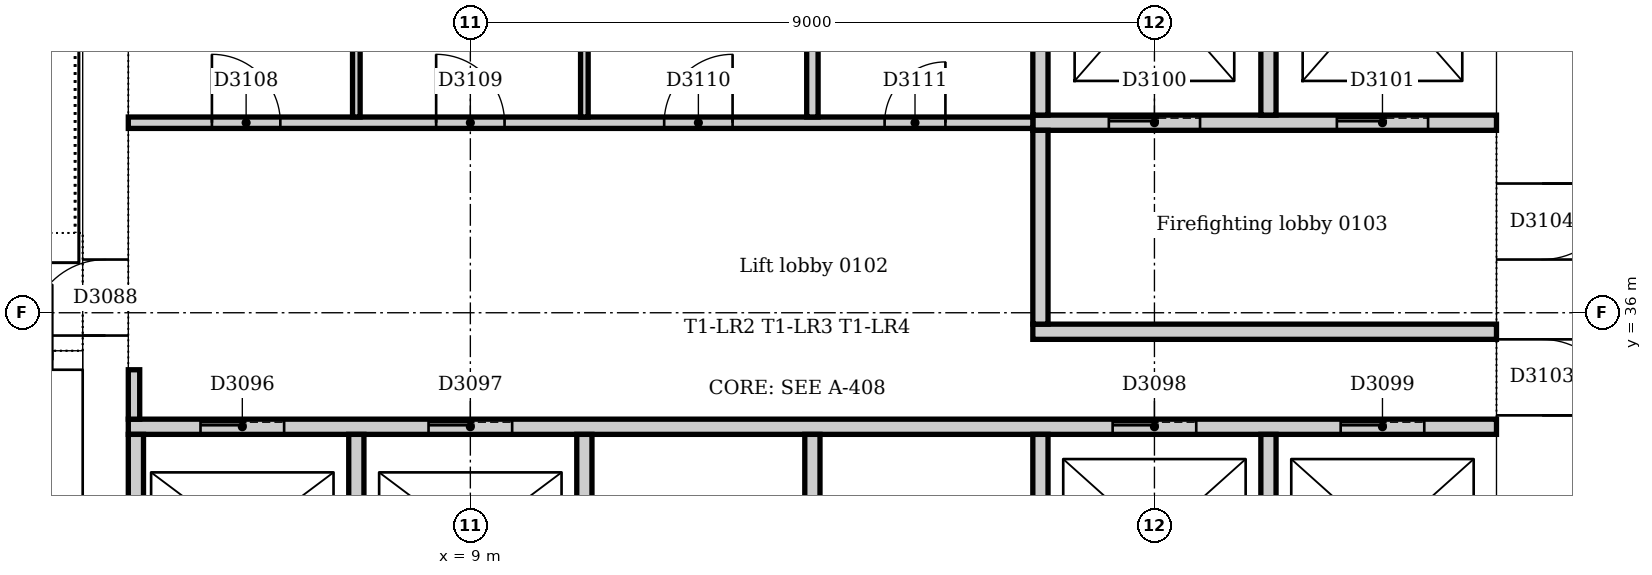
"""IFC4 building model, lengths in metres.
Left out: names, types, materials, properties, quantities, classifications, styles, units other than length and angle.
Written with IfcOpenShell. Run it as: python <this file> out.ifc"""

import sys

from ifc_helpers import new_model, si_unit, direction, frame, frame_2d, origin, place, context, subcontext, project, spatial, rectangle, extrude, element, fill, save


model = new_model("IFC4")
c1 = context("Model", 3, precision=1e-05, world=origin(), true_north=direction((0.0, 1.0)))
c2 = subcontext(c1, "Body", "Model", "MODEL_VIEW")
j1 = project(units=[si_unit("LENGTHUNIT", "METRE"), si_unit("PLANEANGLEUNIT", "RADIAN")], contexts=[c1])
p1 = place(None, origin())
s1 = spatial("IfcSite", under=j1, at=p1, CompositionType="ELEMENT")
p2 = place(p1, origin())
s2 = spatial("IfcBuilding", under=s1, at=p2, CompositionType="ELEMENT")
p3 = place(p2, frame((0.0, 0.0, 6.0)))
s3 = spatial("IfcBuildingStorey", under=s2, at=p3, CompositionType="ELEMENT", Elevation=6.0)
p4 = place(p3, frame((23.1, 31.5, 0.0), z_axis=(0.0, 0.0, 1.0), x_axis=(0.0, 1.0, 0.0)))
e1 = element("IfcWall", 1, at=p4, inside=s3, PredefinedType="SOLIDWALL", context=c2, shape_type="SweptSolid", body=[
    extrude(rectangle(XDim=10.5, YDim=1.2, at=frame_2d((5.25, 0.0))), origin(), (0.0, 0.0, 1.0), 5.0),
])
p5 = place(p4, frame((3.15, 0.0, 0.0)))
e2 = element("IfcOpeningElement", 2, at=p5, cuts=e1, PredefinedType="OPENING", context=c2, shape_type="SweptSolid", body=[
    extrude(rectangle(XDim=1.0, YDim=2.1, at=frame_2d((0.5, 1.05))), frame((0.0, 0.61, 0.0), z_axis=(0.0, -1.0, 0.0), x_axis=(1.0, 0.0, 0.0)), (0.0, 0.0, 1.0), 1.22),
])
p6 = place(p4, frame((5.2, 0.0, 0.0)))
e3 = element("IfcOpeningElement", 3, at=p6, cuts=e1, PredefinedType="OPENING", context=c2, shape_type="SweptSolid", body=[
    extrude(rectangle(XDim=1.0, YDim=2.1, at=frame_2d((0.5, 1.05))), frame((0.0, 0.61, 0.0), z_axis=(0.0, -1.0, 0.0), x_axis=(1.0, 0.0, 0.0)), (0.0, 0.0, 1.0), 1.22),
])
p7 = place(p3, frame((4.2, 42.0, 0.0), z_axis=(0.0, 0.0, 1.0), x_axis=(0.0, -1.0, 0.0)))
e4 = element("IfcWall", 4, at=p7, inside=s3, PredefinedType="SOLIDWALL", context=c2, shape_type="SweptSolid", body=[
    extrude(rectangle(XDim=10.5, YDim=0.6, at=frame_2d((5.25, 0.0))), origin(), (0.0, 0.0, 1.0), 5.0),
])
p8 = place(p7, frame((5.3, 0.0, 0.0)))
e5 = element("IfcOpeningElement", 5, at=p8, cuts=e4, PredefinedType="OPENING", context=c2, shape_type="SweptSolid", body=[
    extrude(rectangle(XDim=1.0, YDim=2.1, at=frame_2d((0.5, 1.05))), frame((0.0, 0.31, 0.0), z_axis=(0.0, -1.0, 0.0), x_axis=(1.0, 0.0, 0.0)), (0.0, 0.0, 1.0), 0.62),
])
p9 = place(p3, frame((0.36, 35.375, 0.0), z_axis=(0.0, 0.0, 1.0), x_axis=(1.0, 0.0, 0.0)))
e6 = element("IfcWall", 6, at=p9, inside=s3, PredefinedType="SOLIDWALL", context=c2, shape_type="SweptSolid", body=[
    extrude(rectangle(XDim=3.54, YDim=0.25, at=frame_2d((1.77, 0.0))), origin(), (0.0, 0.0, 1.0), 5.0),
])
p10 = place(p9, frame((2.14, 0.0, 0.0)))
e7 = element("IfcOpeningElement", 7, at=p10, cuts=e6, PredefinedType="OPENING", context=c2, shape_type="SweptSolid", body=[
    extrude(rectangle(XDim=1.0, YDim=2.1, at=frame_2d((0.5, 1.05))), frame((0.0, 0.135, 0.0), z_axis=(0.0, -1.0, 0.0), x_axis=(1.0, 0.0, 0.0)), (0.0, 0.0, 1.0), 0.27),
])
p11 = place(p3, frame((16.4, 35.75, 0.0), z_axis=(0.0, 0.0, 1.0), x_axis=(1.0, 0.0, 0.0)))
e8 = element("IfcWall", 8, at=p11, inside=s3, PredefinedType="PARTITIONING", context=c2, shape_type="SweptSolid", body=[
    extrude(rectangle(XDim=6.1, YDim=0.2, at=frame_2d((3.05, 0.0))), origin(), (0.0, 0.0, 1.0), 4.7),
])
p12 = place(p3, frame((16.4, 38.5, 0.0), z_axis=(0.0, 0.0, 1.0), x_axis=(1.0, 0.0, 0.0)))
e9 = element("IfcWall", 9, at=p12, inside=s3, PredefinedType="PARTITIONING", context=c2, shape_type="SweptSolid", body=[
    extrude(rectangle(XDim=6.1, YDim=0.2, at=frame_2d((3.05, 0.0))), origin(), (0.0, 0.0, 1.0), 4.7),
])
p13 = place(p12, frame((1.0, 0.0, 0.0)))
e10 = element("IfcOpeningElement", 10, at=p13, cuts=e9, PredefinedType="OPENING", context=c2, shape_type="SweptSolid", body=[
    extrude(rectangle(XDim=1.2, YDim=2.1, at=frame_2d((0.6, 1.05))), frame((0.0, 0.11, 0.0), z_axis=(0.0, -1.0, 0.0), x_axis=(1.0, 0.0, 0.0)), (0.0, 0.0, 1.0), 0.22),
])
p14 = place(p12, frame((4.0, 0.0, 0.0)))
e11 = element("IfcOpeningElement", 11, at=p14, cuts=e9, PredefinedType="OPENING", context=c2, shape_type="SweptSolid", body=[
    extrude(rectangle(XDim=1.2, YDim=2.1, at=frame_2d((0.6, 1.05))), frame((0.0, 0.11, 0.0), z_axis=(0.0, -1.0, 0.0), x_axis=(1.0, 0.0, 0.0)), (0.0, 0.0, 1.0), 0.22),
])
p15 = place(p3, frame((16.5, 35.85, 0.0), z_axis=(0.0, 0.0, 1.0), x_axis=(0.0, 1.0, 0.0)))
e12 = element("IfcWall", 12, at=p15, inside=s3, PredefinedType="PARTITIONING", context=c2, shape_type="SweptSolid", body=[
    extrude(rectangle(XDim=2.55, YDim=0.2, at=frame_2d((1.275, 0.0))), origin(), (0.0, 0.0, 1.0), 4.7),
])
p16 = place(p3, frame((4.5, 34.5, 0.0), z_axis=(0.0, 0.0, 1.0), x_axis=(1.0, 0.0, 0.0)))
e13 = element("IfcWall", 13, at=p16, inside=s3, PredefinedType="PARTITIONING", context=c2, shape_type="SweptSolid", body=[
    extrude(rectangle(XDim=18.0, YDim=0.2, at=frame_2d((9.0, 0.0))), origin(), (0.0, 0.0, 1.0), 4.7),
])
p17 = place(p16, frame((0.95, 0.0, 0.0)))
e14 = element("IfcOpeningElement", 14, at=p17, cuts=e13, PredefinedType="OPENING", context=c2, shape_type="SweptSolid", body=[
    extrude(rectangle(XDim=1.1, YDim=2.1, at=frame_2d((0.55, 1.05))), frame((0.0, 0.11, 0.0), z_axis=(0.0, -1.0, 0.0), x_axis=(1.0, 0.0, 0.0)), (0.0, 0.0, 1.0), 0.22),
])
p18 = place(p16, frame((3.95, 0.0, 0.0)))
e15 = element("IfcOpeningElement", 15, at=p18, cuts=e13, PredefinedType="OPENING", context=c2, shape_type="SweptSolid", body=[
    extrude(rectangle(XDim=1.1, YDim=2.1, at=frame_2d((0.55, 1.05))), frame((0.0, 0.11, 0.0), z_axis=(0.0, -1.0, 0.0), x_axis=(1.0, 0.0, 0.0)), (0.0, 0.0, 1.0), 0.22),
])
p19 = place(p16, frame((12.95, 0.0, 0.0)))
e16 = element("IfcOpeningElement", 16, at=p19, cuts=e13, PredefinedType="OPENING", context=c2, shape_type="SweptSolid", body=[
    extrude(rectangle(XDim=1.1, YDim=2.1, at=frame_2d((0.55, 1.05))), frame((0.0, 0.11, 0.0), z_axis=(0.0, -1.0, 0.0), x_axis=(1.0, 0.0, 0.0)), (0.0, 0.0, 1.0), 0.22),
])
p20 = place(p16, frame((15.95, 0.0, 0.0)))
e17 = element("IfcOpeningElement", 17, at=p20, cuts=e13, PredefinedType="OPENING", context=c2, shape_type="SweptSolid", body=[
    extrude(rectangle(XDim=1.1, YDim=2.1, at=frame_2d((0.55, 1.05))), frame((0.0, 0.11, 0.0), z_axis=(0.0, -1.0, 0.0), x_axis=(1.0, 0.0, 0.0)), (0.0, 0.0, 1.0), 0.22),
])
for number, where, z_axis, x_axis in (
    (18, (16.5, 38.6, 0.0), (0.0, 0.0, 1.0), (0.0, 1.0, 0.0)),
    (19, (19.5, 38.6, 0.0), (0.0, 0.0, 1.0), (0.0, 1.0, 0.0)),
):
    element("IfcWall", number, at=place(p3, frame(where, z_axis=z_axis, x_axis=x_axis)), inside=s3, PredefinedType="PARTITIONING", context=c2, shape_type="SweptSolid", body=[
        extrude(rectangle(XDim=3.4, YDim=0.2, at=frame_2d((1.7, 0.0))), origin(), (0.0, 0.0, 1.0), 4.7),
    ])
for number, where, z_axis, x_axis in (
    (20, (4.6, 31.75, 0.0), (0.0, 0.0, 1.0), (0.0, 1.0, 0.0)),
    (21, (7.5, 31.75, 0.0), (0.0, 0.0, 1.0), (0.0, 1.0, 0.0)),
    (22, (10.5, 31.75, 0.0), (0.0, 0.0, 1.0), (0.0, 1.0, 0.0)),
    (23, (13.5, 31.75, 0.0), (0.0, 0.0, 1.0), (0.0, 1.0, 0.0)),
    (24, (16.5, 31.75, 0.0), (0.0, 0.0, 1.0), (0.0, 1.0, 0.0)),
    (25, (19.5, 31.75, 0.0), (0.0, 0.0, 1.0), (0.0, 1.0, 0.0)),
):
    element("IfcWall", number, at=place(p3, frame(where, z_axis=z_axis, x_axis=x_axis)), inside=s3, PredefinedType="PARTITIONING", context=c2, shape_type="SweptSolid", body=[
        extrude(rectangle(XDim=2.65, YDim=0.2, at=frame_2d((1.325, 0.0))), origin(), (0.0, 0.0, 1.0), 4.7),
    ])
p21 = place(p3, frame((4.5, 38.5, 0.0), z_axis=(0.0, 0.0, 1.0), x_axis=(1.0, 0.0, 0.0)))
e26 = element("IfcWall", 26, at=p21, inside=s3, PredefinedType="PARTITIONING", context=c2, shape_type="SweptSolid", body=[
    extrude(rectangle(XDim=11.9, YDim=0.15, at=frame_2d((5.95, 0.0))), origin(), (0.0, 0.0, 1.0), 4.7),
])
p22 = place(p21, frame((1.1, 0.0, 0.0)))
e27 = element("IfcOpeningElement", 27, at=p22, cuts=e26, PredefinedType="OPENING", context=c2, shape_type="SweptSolid", body=[
    extrude(rectangle(XDim=0.9, YDim=2.1, at=frame_2d((0.45, 1.05))), frame((0.0, 0.085, 0.0), z_axis=(0.0, -1.0, 0.0), x_axis=(1.0, 0.0, 0.0)), (0.0, 0.0, 1.0), 0.17),
])
p23 = place(p21, frame((4.05, 0.0, 0.0)))
e28 = element("IfcOpeningElement", 28, at=p23, cuts=e26, PredefinedType="OPENING", context=c2, shape_type="SweptSolid", body=[
    extrude(rectangle(XDim=0.9, YDim=2.1, at=frame_2d((0.45, 1.05))), frame((0.0, 0.085, 0.0), z_axis=(0.0, -1.0, 0.0), x_axis=(1.0, 0.0, 0.0)), (0.0, 0.0, 1.0), 0.17),
])
p24 = place(p21, frame((7.05, 0.0, 0.0)))
e29 = element("IfcOpeningElement", 29, at=p24, cuts=e26, PredefinedType="OPENING", context=c2, shape_type="SweptSolid", body=[
    extrude(rectangle(XDim=0.9, YDim=2.1, at=frame_2d((0.45, 1.05))), frame((0.0, 0.085, 0.0), z_axis=(0.0, -1.0, 0.0), x_axis=(1.0, 0.0, 0.0)), (0.0, 0.0, 1.0), 0.17),
])
p25 = place(p21, frame((9.95, 0.0, 0.0)))
e30 = element("IfcOpeningElement", 30, at=p25, cuts=e26, PredefinedType="OPENING", context=c2, shape_type="SweptSolid", body=[
    extrude(rectangle(XDim=0.8, YDim=2.1, at=frame_2d((0.4, 1.05))), frame((0.0, 0.085, 0.0), z_axis=(0.0, -1.0, 0.0), x_axis=(1.0, 0.0, 0.0)), (0.0, 0.0, 1.0), 0.17),
])
p26 = place(p3, frame((4.575, 34.6, 0.0), z_axis=(0.0, 0.0, 1.0), x_axis=(0.0, 1.0, 0.0)))
e31 = element("IfcWall", 31, at=p26, inside=s3, PredefinedType="PARTITIONING", context=c2, shape_type="SweptSolid", body=[
    extrude(rectangle(XDim=0.65, YDim=0.15, at=frame_2d((0.325, 0.0))), origin(), (0.0, 0.0, 1.0), 4.7),
])
p27 = place(p3, frame((13.5, 38.575, 0.0), z_axis=(0.0, 0.0, 1.0), x_axis=(0.0, 1.0, 0.0)))
e32 = element("IfcWall", 32, at=p27, inside=s3, PredefinedType="PARTITIONING", context=c2, shape_type="SweptSolid", body=[
    extrude(rectangle(XDim=3.425, YDim=0.15, at=frame_2d((1.712, 0.0))), origin(), (0.0, 0.0, 1.0), 4.7),
])
for number, where, z_axis, x_axis in (
    (33, (7.5, 38.575, 0.0), (0.0, 0.0, 1.0), (0.0, 1.0, 0.0)),
    (34, (10.5, 38.575, 0.0), (0.0, 0.0, 1.0), (0.0, 1.0, 0.0)),
):
    element("IfcWall", number, at=place(p3, frame(where, z_axis=z_axis, x_axis=x_axis)), inside=s3, PredefinedType="PARTITIONING", context=c2, shape_type="SweptSolid", body=[
        extrude(rectangle(XDim=3.425, YDim=0.1, at=frame_2d((1.712, 0.0))), origin(), (0.0, 0.0, 1.0), 4.7),
    ])
p28 = place(p8, frame((1.0, 0.0, 0.0), z_axis=(0.0, 0.0, 1.0), x_axis=(-1.0, 0.0, 0.0)))
e35 = element("IfcDoor", 35, at=p28, inside=s3, OperationType="SINGLE_SWING_LEFT", PredefinedType="DOOR", context=c2, shape_type="SweptSolid", body=[
    extrude(rectangle(XDim=1.0, YDim=2.1, at=frame_2d((0.5, 1.05))), frame((0.0, 0.025, 0.0), z_axis=(0.0, -1.0, 0.0), x_axis=(1.0, 0.0, 0.0)), (0.0, 0.0, 1.0), 0.05),
])
fill(e5, e35)
p29 = place(p17, origin())
e36 = element("IfcDoor", 36, at=p29, inside=s3, OperationType="SLIDING_TO_LEFT", PredefinedType="DOOR", context=c2, shape_type="SweptSolid", body=[
    extrude(rectangle(XDim=1.1, YDim=2.1, at=frame_2d((0.55, 1.05))), frame((0.0, 0.025, 0.0), z_axis=(0.0, -1.0, 0.0), x_axis=(1.0, 0.0, 0.0)), (0.0, 0.0, 1.0), 0.05),
])
fill(e14, e36)
p30 = place(p18, origin())
e37 = element("IfcDoor", 37, at=p30, inside=s3, OperationType="SLIDING_TO_LEFT", PredefinedType="DOOR", context=c2, shape_type="SweptSolid", body=[
    extrude(rectangle(XDim=1.1, YDim=2.1, at=frame_2d((0.55, 1.05))), frame((0.0, 0.025, 0.0), z_axis=(0.0, -1.0, 0.0), x_axis=(1.0, 0.0, 0.0)), (0.0, 0.0, 1.0), 0.05),
])
fill(e15, e37)
p31 = place(p19, origin())
e38 = element("IfcDoor", 38, at=p31, inside=s3, OperationType="SLIDING_TO_LEFT", PredefinedType="DOOR", context=c2, shape_type="SweptSolid", body=[
    extrude(rectangle(XDim=1.1, YDim=2.1, at=frame_2d((0.55, 1.05))), frame((0.0, 0.025, 0.0), z_axis=(0.0, -1.0, 0.0), x_axis=(1.0, 0.0, 0.0)), (0.0, 0.0, 1.0), 0.05),
])
fill(e16, e38)
p32 = place(p20, origin())
e39 = element("IfcDoor", 39, at=p32, inside=s3, OperationType="SLIDING_TO_LEFT", PredefinedType="DOOR", context=c2, shape_type="SweptSolid", body=[
    extrude(rectangle(XDim=1.1, YDim=2.1, at=frame_2d((0.55, 1.05))), frame((0.0, 0.025, 0.0), z_axis=(0.0, -1.0, 0.0), x_axis=(1.0, 0.0, 0.0)), (0.0, 0.0, 1.0), 0.05),
])
fill(e17, e39)
p33 = place(p13, origin())
e40 = element("IfcDoor", 40, at=p33, inside=s3, OperationType="SLIDING_TO_LEFT", PredefinedType="DOOR", context=c2, shape_type="SweptSolid", body=[
    extrude(rectangle(XDim=1.2, YDim=2.1, at=frame_2d((0.6, 1.05))), frame((0.0, 0.025, 0.0), z_axis=(0.0, -1.0, 0.0), x_axis=(1.0, 0.0, 0.0)), (0.0, 0.0, 1.0), 0.05),
])
fill(e10, e40)
p34 = place(p14, origin())
e41 = element("IfcDoor", 41, at=p34, inside=s3, OperationType="SLIDING_TO_LEFT", PredefinedType="DOOR", context=c2, shape_type="SweptSolid", body=[
    extrude(rectangle(XDim=1.2, YDim=2.1, at=frame_2d((0.6, 1.05))), frame((0.0, 0.025, 0.0), z_axis=(0.0, -1.0, 0.0), x_axis=(1.0, 0.0, 0.0)), (0.0, 0.0, 1.0), 0.05),
])
fill(e11, e41)
p35 = place(p5, frame((1.0, 0.0, 0.0), z_axis=(0.0, 0.0, 1.0), x_axis=(-1.0, 0.0, 0.0)))
e42 = element("IfcDoor", 42, at=p35, inside=s3, OperationType="SINGLE_SWING_RIGHT", PredefinedType="DOOR", context=c2, shape_type="SweptSolid", body=[
    extrude(rectangle(XDim=1.0, YDim=2.1, at=frame_2d((0.5, 1.05))), frame((0.0, 0.025, 0.0), z_axis=(0.0, -1.0, 0.0), x_axis=(1.0, 0.0, 0.0)), (0.0, 0.0, 1.0), 0.05),
])
fill(e2, e42)
p36 = place(p6, frame((1.0, 0.0, 0.0), z_axis=(0.0, 0.0, 1.0), x_axis=(-1.0, 0.0, 0.0)))
e43 = element("IfcDoor", 43, at=p36, inside=s3, OperationType="SINGLE_SWING_LEFT", PredefinedType="DOOR", context=c2, shape_type="SweptSolid", body=[
    extrude(rectangle(XDim=1.0, YDim=2.1, at=frame_2d((0.5, 1.05))), frame((0.0, 0.025, 0.0), z_axis=(0.0, -1.0, 0.0), x_axis=(1.0, 0.0, 0.0)), (0.0, 0.0, 1.0), 0.05),
])
fill(e3, e43)
p37 = place(p22, origin())
e44 = element("IfcDoor", 44, at=p37, inside=s3, OperationType="SINGLE_SWING_LEFT", PredefinedType="DOOR", context=c2, shape_type="SweptSolid", body=[
    extrude(rectangle(XDim=0.9, YDim=2.1, at=frame_2d((0.45, 1.05))), frame((0.0, 0.025, 0.0), z_axis=(0.0, -1.0, 0.0), x_axis=(1.0, 0.0, 0.0)), (0.0, 0.0, 1.0), 0.05),
])
fill(e27, e44)
p38 = place(p23, origin())
e45 = element("IfcDoor", 45, at=p38, inside=s3, OperationType="SINGLE_SWING_LEFT", PredefinedType="DOOR", context=c2, shape_type="SweptSolid", body=[
    extrude(rectangle(XDim=0.9, YDim=2.1, at=frame_2d((0.45, 1.05))), frame((0.0, 0.025, 0.0), z_axis=(0.0, -1.0, 0.0), x_axis=(1.0, 0.0, 0.0)), (0.0, 0.0, 1.0), 0.05),
])
fill(e28, e45)
p39 = place(p24, origin())
e46 = element("IfcDoor", 46, at=p39, inside=s3, OperationType="SINGLE_SWING_RIGHT", PredefinedType="DOOR", context=c2, shape_type="SweptSolid", body=[
    extrude(rectangle(XDim=0.9, YDim=2.1, at=frame_2d((0.45, 1.05))), frame((0.0, 0.025, 0.0), z_axis=(0.0, -1.0, 0.0), x_axis=(1.0, 0.0, 0.0)), (0.0, 0.0, 1.0), 0.05),
])
fill(e29, e46)
p40 = place(p25, origin())
e47 = element("IfcDoor", 47, at=p40, inside=s3, OperationType="SINGLE_SWING_RIGHT", PredefinedType="DOOR", context=c2, shape_type="SweptSolid", body=[
    extrude(rectangle(XDim=0.8, YDim=2.1, at=frame_2d((0.4, 1.05))), frame((0.0, 0.025, 0.0), z_axis=(0.0, -1.0, 0.0), x_axis=(1.0, 0.0, 0.0)), (0.0, 0.0, 1.0), 0.05),
])
fill(e30, e47)
save(model, sys.argv[1])
